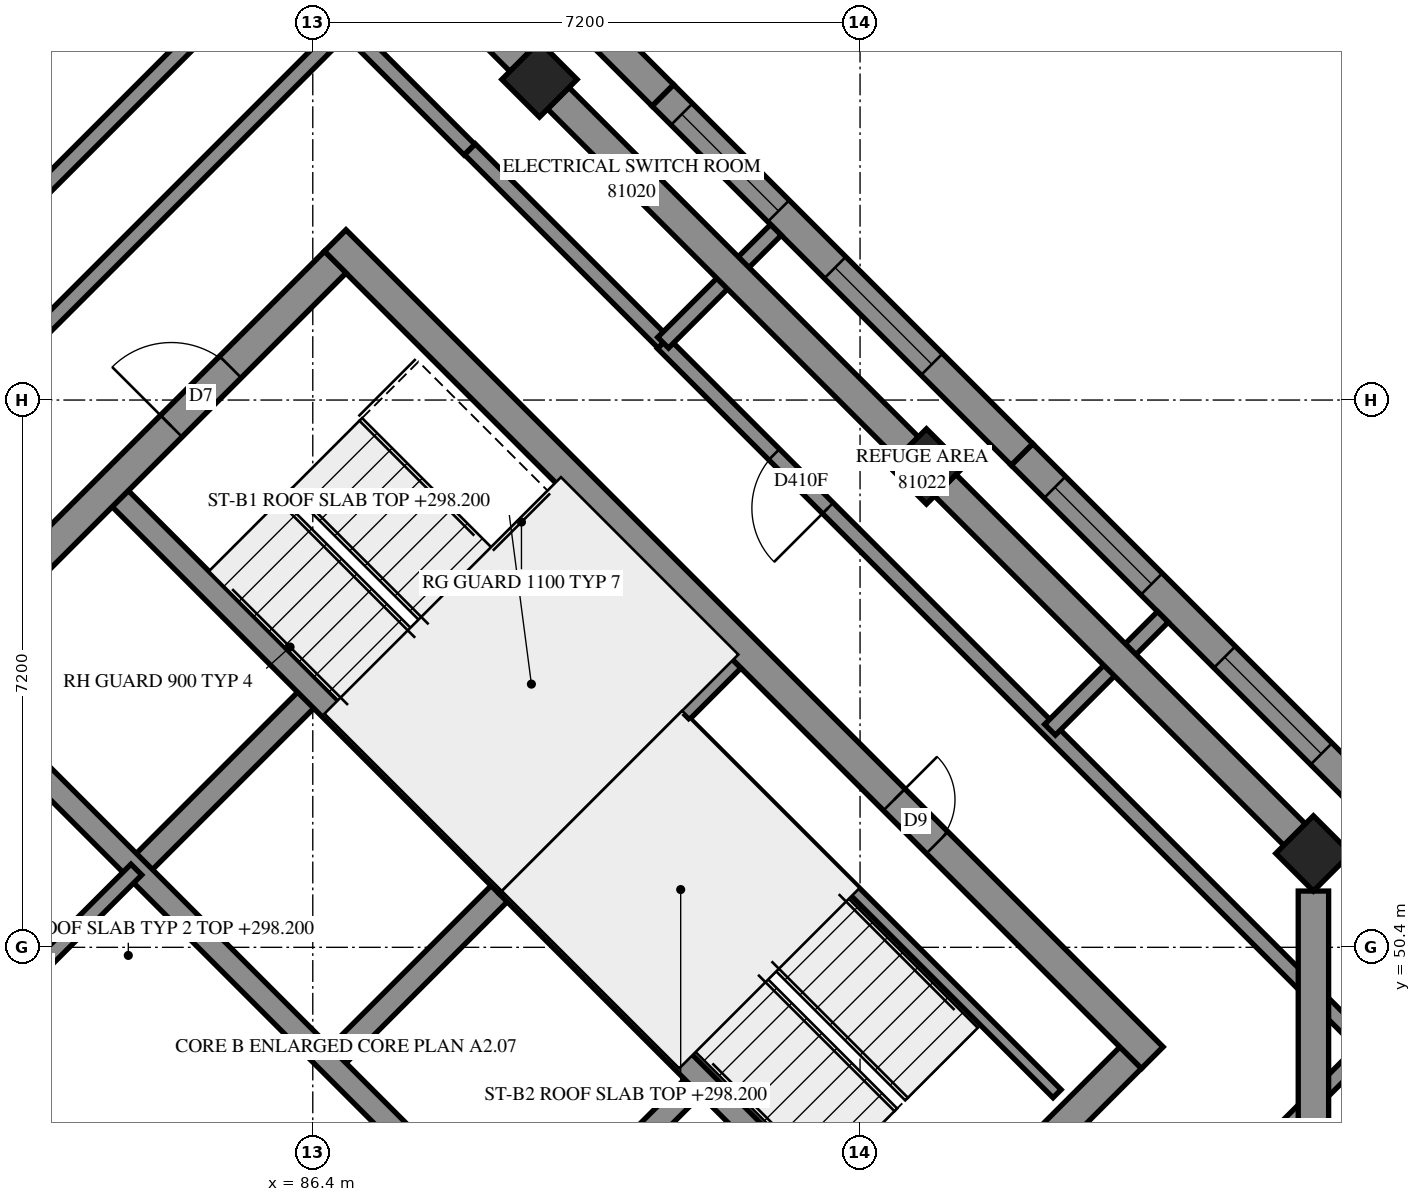
"""IFC4 building model, lengths in metres.
Left out: names, types, materials, properties, quantities, classifications, styles, units other than length and angle.
Written with IfcOpenShell. Run it as: python <this file> out.ifc"""

import sys

from ifc_helpers import new_model, si_unit, direction, frame, frame_2d, origin, origin_2d, place, context, subcontext, project, spatial, polyline, rectangle, outline, extrude, element, fill, save


model = new_model("IFC4")
c1 = context("Model", 3, precision=1e-05, world=origin(), true_north=direction((0.0, 1.0)))
c2 = subcontext(c1, "Body", "Model", "MODEL_VIEW")
j1 = project(units=[si_unit("LENGTHUNIT", "METRE"), si_unit("PLANEANGLEUNIT", "RADIAN")], contexts=[c1])
p1 = place(None, origin())
s1 = spatial("IfcSite", under=j1, at=p1, CompositionType="ELEMENT")
p2 = place(p1, origin())
s2 = spatial("IfcBuilding", under=s1, at=p2, CompositionType="ELEMENT")
p3 = place(p2, frame((0.0, 0.0, 298.2)))
s3 = spatial("IfcBuildingStorey", under=s2, at=p3, CompositionType="ELEMENT", Elevation=298.2)
for number, where, z_axis, x_axis in (
    (1, (89.382, 61.818, 0.0), (0.0, 0.0, 1.0), (0.707, -0.707, 0.0)),
    (2, (94.474, 56.727, 0.0), (0.0, 0.0, 1.0), (0.707, -0.707, 0.0)),
    (3, (99.565, 51.635, 0.0), (0.0, 0.0, 1.0), (0.707, -0.707, 0.0)),
):
    element("IfcColumn", number, at=place(p3, frame(where, z_axis=z_axis, x_axis=x_axis)), inside=s3, PredefinedType="COLUMN", context=c2, shape_type="SweptSolid", body=[
        extrude(rectangle(XDim=0.7, YDim=0.7, at=origin_2d()), origin(), (0.0, 0.0, 1.0), 3.5),
    ])
p4 = place(p3, frame((86.695, 59.696, -0.3), z_axis=(0.0, 0.0, 1.0), x_axis=(0.7071100706, -0.7071034917, 0.0)))
e4 = element("IfcWall", 4, at=p4, inside=s3, PredefinedType="SHEAR", context=c2, shape_type="SweptSolid", body=[
    extrude(outline(polyline([(0.0, 0.0), (15.2, 0.0), (15.2, 3.1), (0.0, 3.1), (0.0, 0.0)])), frame((0.0, 0.2, 0.0), z_axis=(0.0, -1.0, 0.0), x_axis=(1.0, 0.0, 0.0)), (0.0, 0.0, 1.0), 0.4),
])
p5 = place(p4, frame((10.4, 0.0, 0.3)))
e5 = element("IfcOpeningElement", 5, at=p5, cuts=e4, PredefinedType="OPENING", context=c2, shape_type="SweptSolid", body=[
    extrude(rectangle(XDim=0.8, YDim=2.1, at=frame_2d((0.4, 1.05))), frame((0.0, 0.21, 0.0), z_axis=(0.0, -1.0, 0.0), x_axis=(1.0, 0.0, 0.0)), (0.0, 0.0, 1.0), 0.42),
])
p6 = place(p3, frame((76.513, 49.231, -0.3), z_axis=(0.0, 0.0, 1.0), x_axis=(0.7071067812, 0.7071067812, 0.0)))
e6 = element("IfcWall", 6, at=p6, inside=s3, PredefinedType="SHEAR", context=c2, shape_type="SweptSolid", body=[
    extrude(outline(polyline([(0.0, 0.0), (14.4, 0.0), (14.4, 3.1), (0.0, 3.1), (0.0, 0.0)])), frame((0.0, 0.2, 0.0), z_axis=(0.0, -1.0, 0.0), x_axis=(1.0, 0.0, 0.0)), (0.0, 0.0, 1.0), 0.4),
])
p7 = place(p6, frame((4.55, 0.0, 0.3)))
e7 = element("IfcOpeningElement", 7, at=p7, cuts=e6, PredefinedType="OPENING", context=c2, shape_type="SweptSolid", body=[
    extrude(rectangle(XDim=1.1, YDim=2.1, at=frame_2d((0.55, 1.05))), frame((0.0, 0.21, 0.0), z_axis=(0.0, -1.0, 0.0), x_axis=(1.0, 0.0, 0.0)), (0.0, 0.0, 1.0), 0.42),
])
p8 = place(p6, frame((11.35, 0.0, 0.3)))
e8 = element("IfcOpeningElement", 8, at=p8, cuts=e6, PredefinedType="OPENING", context=c2, shape_type="SweptSolid", body=[
    extrude(rectangle(XDim=1.1, YDim=2.1, at=frame_2d((0.55, 1.05))), frame((0.0, 0.21, 0.0), z_axis=(0.0, -1.0, 0.0), x_axis=(1.0, 0.0, 0.0)), (0.0, 0.0, 1.0), 0.42),
])
p9 = place(p3, frame((89.17, 40.958, -0.3), z_axis=(0.0, 0.0, 1.0), x_axis=(0.7071067812, 0.7071067812, 0.0)))
e9 = element("IfcWall", 9, at=p9, inside=s3, PredefinedType="SHEAR", context=c2, shape_type="SweptSolid", body=[
    extrude(outline(polyline([(0.0, 0.0), (11.3, 0.0), (11.3, 3.1), (0.0, 3.1), (0.0, 0.0)])), frame((0.0, 0.2, 0.0), z_axis=(0.0, -1.0, 0.0), x_axis=(1.0, 0.0, 0.0)), (0.0, 0.0, 1.0), 0.4),
])
p10 = place(p9, frame((1.45, 0.0, 0.3)))
e10 = element("IfcOpeningElement", 10, at=p10, cuts=e9, PredefinedType="OPENING", context=c2, shape_type="SweptSolid", body=[
    extrude(rectangle(XDim=1.1, YDim=2.1, at=frame_2d((0.55, 1.05))), frame((0.0, 0.21, 0.0), z_axis=(0.0, -1.0, 0.0), x_axis=(1.0, 0.0, 0.0)), (0.0, 0.0, 1.0), 0.42),
])
p11 = place(p9, frame((8.25, 0.0, 0.3)))
e11 = element("IfcOpeningElement", 11, at=p11, cuts=e9, PredefinedType="OPENING", context=c2, shape_type="SweptSolid", body=[
    extrude(rectangle(XDim=1.1, YDim=2.1, at=frame_2d((0.55, 1.05))), frame((0.0, 0.21, 0.0), z_axis=(0.0, -1.0, 0.0), x_axis=(1.0, 0.0, 0.0)), (0.0, 0.0, 1.0), 0.42),
])
p12 = place(p3, frame((84.079, 51.423, 0.0), z_axis=(0.0, 0.0, 1.0), x_axis=(0.7071219326, 0.7070916295, 0.0)))
e12 = element("IfcWall", 12, at=p12, inside=s3, PredefinedType="SOLIDWALL", context=c2, shape_type="SweptSolid", body=[
    extrude(outline(polyline([(0.0, 0.0), (3.3, 0.0), (3.3, 3.5), (0.0, 3.5), (0.0, 0.0)])), frame((0.0, 0.15, 0.0), z_axis=(0.0, -1.0, 0.0), x_axis=(1.0, 0.0, 0.0)), (0.0, 0.0, 1.0), 0.3),
])
for number, where, z_axis, x_axis in (
    (13, (86.625, 48.878, 0.0), (0.0, 0.0, 1.0), (0.707, 0.707, 0.0)),
    (14, (89.17, 46.332, 0.0), (0.0, 0.0, 1.0), (0.707, 0.707, 0.0)),
):
    element("IfcWall", number, at=place(p3, frame(where, z_axis=z_axis, x_axis=x_axis)), inside=s3, PredefinedType="SOLIDWALL", context=c2, shape_type="SweptSolid", body=[
        extrude(outline(polyline([(0.0, 0.0), (3.3, 0.0), (3.3, 3.5), (0.0, 3.5), (0.0, 0.0)])), frame((0.0, 0.15, 0.0), z_axis=(0.0, -1.0, 0.0), x_axis=(1.0, 0.0, 0.0)), (0.0, 0.0, 1.0), 0.3),
    ])
p13 = place(p3, frame((78.988, 51.423, 0.0), z_axis=(0.0, 0.0, 1.0), x_axis=(0.7071067812, -0.7071067812, 0.0)))
e15 = element("IfcWall", 15, at=p13, inside=s3, PredefinedType="SOLIDWALL", context=c2, shape_type="SweptSolid", body=[
    extrude(outline(polyline([(0.0, 0.0), (14.4, 0.0), (14.4, 3.5), (0.0, 3.5), (0.0, 0.0)])), frame((0.0, 0.15, 0.0), z_axis=(0.0, -1.0, 0.0), x_axis=(1.0, 0.0, 0.0)), (0.0, 0.0, 1.0), 0.3),
])
p14 = place(p3, frame((81.534, 53.969, 0.0), z_axis=(0.0, 0.0, 1.0), x_axis=(0.707103309, -0.7071102534, 0.0)))
e16 = element("IfcWall", 16, at=p14, inside=s3, PredefinedType="SOLIDWALL", context=c2, shape_type="SweptSolid", body=[
    extrude(outline(polyline([(0.0, 0.0), (14.4, 0.0), (14.4, 3.5), (0.0, 3.5), (0.0, 0.0)])), frame((0.0, 0.15, 0.0), z_axis=(0.0, -1.0, 0.0), x_axis=(1.0, 0.0, 0.0)), (0.0, 0.0, 1.0), 0.3),
])
p15 = place(p14, frame((12.05, 0.0, 0.0)))
e17 = element("IfcOpeningElement", 17, at=p15, cuts=e16, PredefinedType="OPENING", context=c2, shape_type="SweptSolid", body=[
    extrude(rectangle(XDim=1.1, YDim=2.1, at=frame_2d((0.55, 1.05))), frame((0.0, 0.16, 0.0), z_axis=(0.0, -1.0, 0.0), x_axis=(1.0, 0.0, 0.0)), (0.0, 0.0, 1.0), 0.32),
])
for number, where, z_axis, x_axis in (
    (18, (83.867, 56.302, 0.0), (0.0, 0.0, 1.0), (0.707, -0.707, 0.0)),
    (19, (88.958, 51.211, 0.0), (0.0, 0.0, 1.0), (0.707, -0.707, 0.0)),
):
    element("IfcWall", number, at=place(p3, frame(where, z_axis=z_axis, x_axis=x_axis)), inside=s3, PredefinedType="SOLIDWALL", context=c2, shape_type="SweptSolid", body=[
        extrude(outline(polyline([(0.0, 0.0), (7.2, 0.0), (7.2, 3.5), (0.0, 3.5), (0.0, 0.0)])), frame((0.0, 0.15, 0.0), z_axis=(0.0, -1.0, 0.0), x_axis=(1.0, 0.0, 0.0)), (0.0, 0.0, 1.0), 0.3),
    ])
p16 = place(p3, frame((88.958, 51.211, 0.0), z_axis=(0.0, 0.0, 1.0), x_axis=(0.7071067812, 0.7071067812, 0.0)))
e20 = element("IfcWall", 20, at=p16, inside=s3, PredefinedType="SOLIDWALL", context=c2, shape_type="SweptSolid", body=[
    extrude(outline(polyline([(0.0, 0.0), (4.2, 0.0), (4.2, 3.5), (0.0, 3.5), (0.0, 0.0)])), frame((0.0, 0.15, 0.0), z_axis=(0.0, -1.0, 0.0), x_axis=(1.0, 0.0, 0.0)), (0.0, 0.0, 1.0), 0.3),
])
p17 = place(p3, frame((99.282, 46.544, 0.0), z_axis=(0.0, 0.0, 1.0), x_axis=(0.7071067812, 0.7071067812, 0.0)))
e21 = element("IfcWall", 21, at=p17, inside=s3, PredefinedType="SOLIDWALL", context=c2, shape_type="SweptSolid", body=[
    extrude(outline(polyline([(0.2, -0.2), (6.23, -0.2), (5.657, 0.2), (-0.2, 0.2), (0.2, -0.2)])), origin(), (0.0, 0.0, 1.0), 3.5),
])
p18 = place(p17, frame((1.1, 0.0, 0.7)))
e22 = element("IfcOpeningElement", 22, at=p18, cuts=e21, PredefinedType="OPENING", context=c2, shape_type="SweptSolid", body=[
    extrude(rectangle(XDim=1.8, YDim=2.2, at=frame_2d((0.9, 1.1))), frame((0.0, 0.21, 0.0), z_axis=(0.0, -1.0, 0.0), x_axis=(1.0, 0.0, 0.0)), (0.0, 0.0, 1.0), 0.42),
])
p19 = place(p3, frame((100.48, 52.134, 0.0), z_axis=(0.0, 0.0, 1.0), x_axis=(-0.7071067812, 0.7071067812, 0.0)))
e23 = element("IfcWall", 23, at=p19, inside=s3, PredefinedType="SOLIDWALL", context=c2, shape_type="SweptSolid", body=[
    extrude(outline(polyline([(0.036, -0.2), (6.718, -0.2), (6.718, 0.2), (-0.036, 0.2), (0.036, -0.2)])), origin(), (0.0, 0.0, 1.0), 3.5),
])
p20 = place(p19, frame((1.147, 0.0, 0.7)))
e24 = element("IfcOpeningElement", 24, at=p20, cuts=e23, PredefinedType="OPENING", context=c2, shape_type="SweptSolid", body=[
    extrude(rectangle(XDim=1.8, YDim=2.2, at=frame_2d((0.9, 1.1))), frame((0.0, 0.21, 0.0), z_axis=(0.0, -1.0, 0.0), x_axis=(1.0, 0.0, 0.0)), (0.0, 0.0, 1.0), 0.42),
])
p21 = place(p19, frame((4.306, 0.0, 0.7)))
e25 = element("IfcOpeningElement", 25, at=p21, cuts=e23, PredefinedType="OPENING", context=c2, shape_type="SweptSolid", body=[
    extrude(rectangle(XDim=1.8, YDim=2.2, at=frame_2d((0.9, 1.1))), frame((0.0, 0.21, 0.0), z_axis=(0.0, -1.0, 0.0), x_axis=(1.0, 0.0, 0.0)), (0.0, 0.0, 1.0), 0.42),
])
p22 = place(p3, frame((95.73, 56.884, 0.0), z_axis=(0.0, 0.0, 1.0), x_axis=(-0.7071067812, 0.7071067812, 0.0)))
e26 = element("IfcWall", 26, at=p22, inside=s3, PredefinedType="SOLIDWALL", context=c2, shape_type="SweptSolid", body=[
    extrude(outline(polyline([(0.0, -0.2), (6.682, -0.2), (6.682, 0.2), (0.0, 0.2), (0.0, -0.2)])), origin(), (0.0, 0.0, 1.0), 3.5),
])
p23 = place(p22, frame((1.677, 0.0, 0.7)))
e27 = element("IfcOpeningElement", 27, at=p23, cuts=e26, PredefinedType="OPENING", context=c2, shape_type="SweptSolid", body=[
    extrude(rectangle(XDim=1.8, YDim=2.2, at=frame_2d((0.9, 1.1))), frame((0.0, 0.21, 0.0), z_axis=(0.0, -1.0, 0.0), x_axis=(1.0, 0.0, 0.0)), (0.0, 0.0, 1.0), 0.42),
])
p24 = place(p22, frame((4.529, 0.0, 0.7)))
e28 = element("IfcOpeningElement", 28, at=p24, cuts=e26, PredefinedType="OPENING", context=c2, shape_type="SweptSolid", body=[
    extrude(rectangle(XDim=1.8, YDim=2.2, at=frame_2d((0.9, 1.1))), frame((0.0, 0.21, 0.0), z_axis=(0.0, -1.0, 0.0), x_axis=(1.0, 0.0, 0.0)), (0.0, 0.0, 1.0), 0.42),
])
p25 = place(p3, frame((91.005, 61.609, 0.0), z_axis=(0.0, 0.0, 1.0), x_axis=(-0.7071142638, 0.7070992985, 0.0)))
e29 = element("IfcWall", 29, at=p25, inside=s3, PredefinedType="SOLIDWALL", context=c2, shape_type="SweptSolid", body=[
    extrude(outline(polyline([(0.0, -0.2), (6.682, -0.2), (6.682, 0.2), (0.0, 0.2), (0.0, -0.2)])), origin(), (0.0, 0.0, 1.0), 3.5),
])
p26 = place(p25, frame((2.195, 0.0, 0.7)))
e30 = element("IfcOpeningElement", 30, at=p26, cuts=e29, PredefinedType="OPENING", context=c2, shape_type="SweptSolid", body=[
    extrude(rectangle(XDim=1.8, YDim=2.2, at=frame_2d((0.9, 1.1))), frame((0.0, 0.21, 0.0), z_axis=(0.0, -1.0, 0.0), x_axis=(1.0, 0.0, 0.0)), (0.0, 0.0, 1.0), 0.42),
])
p27 = place(p3, frame((91.313, 53.354, 0.0), z_axis=(0.0, 0.0, 1.0), x_axis=(0.7071140275, -0.7070995348, 0.0)))
e31 = element("IfcWall", 31, at=p27, inside=s3, PredefinedType="PARTITIONING", context=c2, shape_type="SweptSolid", body=[
    extrude(outline(polyline([(0.0, 0.0), (6.9, 0.0), (6.9, 3.5), (0.0, 3.5), (0.0, 0.0)])), frame((0.0, 0.075, 0.0), z_axis=(0.0, -1.0, 0.0), x_axis=(1.0, 0.0, 0.0)), (0.0, 0.0, 1.0), 0.15),
])
p28 = place(p3, frame((81.534, 48.878, 0.0), z_axis=(0.0, 0.0, 1.0), x_axis=(0.707092892, 0.7071206701, 0.0)))
e32 = element("IfcWall", 32, at=p28, inside=s3, PredefinedType="PARTITIONING", context=c2, shape_type="SweptSolid", body=[
    extrude(outline(polyline([(0.0, 0.0), (3.6, 0.0), (3.6, 3.5), (0.0, 3.5), (0.0, 0.0)])), frame((0.0, 0.1, 0.0), z_axis=(0.0, -1.0, 0.0), x_axis=(1.0, 0.0, 0.0)), (0.0, 0.0, 1.0), 0.2),
])
p29 = place(p28, frame((1.25, 0.0, 0.0)))
e33 = element("IfcOpeningElement", 33, at=p29, cuts=e32, PredefinedType="OPENING", context=c2, shape_type="SweptSolid", body=[
    extrude(rectangle(XDim=1.1, YDim=2.1, at=frame_2d((0.55, 1.05))), frame((0.0, 0.11, 0.0), z_axis=(0.0, -1.0, 0.0), x_axis=(1.0, 0.0, 0.0)), (0.0, 0.0, 1.0), 0.22),
])
p30 = place(p3, frame((100.269, 49.087, 0.0), z_axis=(0.0, 0.0, 1.0), x_axis=(-0.7071525817, 0.7070609777, 0.0)))
e34 = element("IfcWall", 34, at=p30, inside=s3, PredefinedType="PARTITIONING", context=c2, shape_type="SweptSolid", body=[
    extrude(rectangle(XDim=13.1, YDim=0.2, at=frame_2d((6.55, 0.0))), origin(), (0.0, 0.0, 1.0), 3.5),
])
p31 = place(p30, frame((10.029, 0.0, 0.0)))
e35 = element("IfcOpeningElement", 35, at=p31, cuts=e34, PredefinedType="OPENING", context=c2, shape_type="SweptSolid", body=[
    extrude(rectangle(XDim=1.0, YDim=2.1, at=frame_2d((0.5, 1.05))), frame((0.0, 0.11, 0.0), z_axis=(0.0, -1.0, 0.0), x_axis=(1.0, 0.0, 0.0)), (0.0, 0.0, 1.0), 0.22),
])
p32 = place(p3, frame((94.225, 43.045, 0.0), z_axis=(0.0, 0.0, 1.0), x_axis=(0.7071067812, 0.7071067812, 0.0)))
e36 = element("IfcWall", 36, at=p32, inside=s3, PredefinedType="PARTITIONING", context=c2, shape_type="SweptSolid", body=[
    extrude(rectangle(XDim=8.55, YDim=0.2, at=frame_2d((4.275, 0.0))), origin(), (0.0, 0.0, 1.0), 3.5),
])
p33 = place(p32, frame((0.256, 0.0, 0.0)))
e37 = element("IfcOpeningElement", 37, at=p33, cuts=e36, PredefinedType="OPENING", context=c2, shape_type="SweptSolid", body=[
    extrude(rectangle(XDim=1.0, YDim=2.1, at=frame_2d((0.5, 1.05))), frame((0.0, 0.11, 0.0), z_axis=(0.0, -1.0, 0.0), x_axis=(1.0, 0.0, 0.0)), (0.0, 0.0, 1.0), 0.22),
])
p34 = place(p3, frame((80.801, 56.491, 0.0), z_axis=(0.0, 0.0, 1.0), x_axis=(0.7071067812, 0.7071067812, 0.0)))
e38 = element("IfcWall", 38, at=p34, inside=s3, PredefinedType="PARTITIONING", context=c2, shape_type="SweptSolid", body=[
    extrude(rectangle(XDim=8.533, YDim=0.2, at=frame_2d((4.267, 0.0))), origin(), (0.0, 0.0, 1.0), 3.5),
])
p35 = place(p34, frame((0.856, 0.0, 0.0)))
e39 = element("IfcOpeningElement", 39, at=p35, cuts=e38, PredefinedType="OPENING", context=c2, shape_type="SweptSolid", body=[
    extrude(rectangle(XDim=1.0, YDim=2.1, at=frame_2d((0.5, 1.05))), frame((0.0, 0.11, 0.0), z_axis=(0.0, -1.0, 0.0), x_axis=(1.0, 0.0, 0.0)), (0.0, 0.0, 1.0), 0.22),
])
p36 = place(p3, frame((88.466, 60.9, 0.0), z_axis=(0.0, 0.0, 1.0), x_axis=(0.7073845681, -0.7068288851, 0.0)))
e40 = element("IfcWall", 40, at=p36, inside=s3, PredefinedType="PARTITIONING", context=c2, shape_type="SweptSolid", body=[
    extrude(rectangle(XDim=3.599, YDim=0.2, at=frame_2d((1.8, 0.0))), origin(), (0.0, 0.0, 1.0), 3.5),
])
p37 = place(p3, frame((86.835, 62.52, 0.0), z_axis=(0.0, 0.0, 1.0), x_axis=(0.7071067812, -0.7071067812, 0.0)))
e41 = element("IfcWall", 41, at=p37, inside=s3, PredefinedType="PARTITIONING", context=c2, shape_type="SweptSolid", body=[
    extrude(rectangle(XDim=2.3, YDim=0.2, at=frame_2d((1.15, 0.0))), origin(), (0.0, 0.0, 1.0), 3.5),
])
p38 = place(p3, frame((80.799, 58.327, 0.0), z_axis=(0.0, 0.0, 1.0), x_axis=(0.7071067812, 0.7071067812, 0.0)))
e42 = element("IfcWall", 42, at=p38, inside=s3, PredefinedType="PARTITIONING", context=c2, shape_type="SweptSolid", body=[
    extrude(outline(polyline([(0.0, -0.1), (9.338, -0.1), (9.338, 0.1), (0.0, 0.1), (0.0, -0.1)])), origin(), (0.0, 0.0, 1.0), 3.5),
])
p39 = place(p3, frame((96.099, 53.263, 0.0), z_axis=(0.0, 0.0, 1.0), x_axis=(0.7071067812, 0.7071067812, 0.0)))
e43 = element("IfcWall", 43, at=p39, inside=s3, PredefinedType="PARTITIONING", context=c2, shape_type="SweptSolid", body=[
    extrude(outline(polyline([(0.0, -0.1), (2.1, -0.1), (2.1, 0.1), (0.0, 0.1), (0.0, -0.1)])), origin(), (0.0, 0.0, 1.0), 3.5),
])
p40 = place(p3, frame((91.009, 58.355, 0.0), z_axis=(0.0, 0.0, 1.0), x_axis=(0.7071067812, 0.7071067812, 0.0)))
e44 = element("IfcWall", 44, at=p40, inside=s3, PredefinedType="PARTITIONING", context=c2, shape_type="SweptSolid", body=[
    extrude(outline(polyline([(0.0, -0.1), (2.098, -0.1), (2.098, 0.1), (0.0, 0.1), (0.0, -0.1)])), origin(), (0.0, 0.0, 1.0), 3.5),
])
p41 = place(p20, origin())
e45 = element("IfcWindow", 45, at=p41, inside=s3, PartitioningType="SINGLE_PANEL", PredefinedType="WINDOW", context=c2, shape_type="SweptSolid", body=[
    extrude(rectangle(XDim=1.8, YDim=2.2, at=frame_2d((0.9, 1.1))), frame((0.0, 0.08, 0.0), z_axis=(0.0, -1.0, 0.0), x_axis=(1.0, 0.0, 0.0)), (0.0, 0.0, 1.0), 0.06),
])
fill(e24, e45)
p42 = place(p21, origin())
e46 = element("IfcWindow", 46, at=p42, inside=s3, PartitioningType="SINGLE_PANEL", PredefinedType="WINDOW", context=c2, shape_type="SweptSolid", body=[
    extrude(rectangle(XDim=1.8, YDim=2.2, at=frame_2d((0.9, 1.1))), frame((0.0, 0.08, 0.0), z_axis=(0.0, -1.0, 0.0), x_axis=(1.0, 0.0, 0.0)), (0.0, 0.0, 1.0), 0.06),
])
fill(e25, e46)
p43 = place(p23, origin())
e47 = element("IfcWindow", 47, at=p43, inside=s3, PartitioningType="SINGLE_PANEL", PredefinedType="WINDOW", context=c2, shape_type="SweptSolid", body=[
    extrude(rectangle(XDim=1.8, YDim=2.2, at=frame_2d((0.9, 1.1))), frame((0.0, 0.08, 0.0), z_axis=(0.0, -1.0, 0.0), x_axis=(1.0, 0.0, 0.0)), (0.0, 0.0, 1.0), 0.06),
])
fill(e27, e47)
p44 = place(p24, origin())
e48 = element("IfcWindow", 48, at=p44, inside=s3, PartitioningType="SINGLE_PANEL", PredefinedType="WINDOW", context=c2, shape_type="SweptSolid", body=[
    extrude(rectangle(XDim=1.8, YDim=2.2, at=frame_2d((0.9, 1.1))), frame((0.0, 0.08, 0.0), z_axis=(0.0, -1.0, 0.0), x_axis=(1.0, 0.0, 0.0)), (0.0, 0.0, 1.0), 0.06),
])
fill(e28, e48)
p45 = place(p5, origin())
e49 = element("IfcDoor", 49, at=p45, inside=s3, OperationType="SINGLE_SWING_RIGHT", PredefinedType="DOOR", context=c2, shape_type="SweptSolid", body=[
    extrude(rectangle(XDim=0.8, YDim=2.1, at=frame_2d((0.4, 1.05))), frame((0.0, 0.025, 0.0), z_axis=(0.0, -1.0, 0.0), x_axis=(1.0, 0.0, 0.0)), (0.0, 0.0, 1.0), 0.05),
])
fill(e5, e49)
p46 = place(p8, origin())
e50 = element("IfcDoor", 50, at=p46, inside=s3, OperationType="SINGLE_SWING_LEFT", PredefinedType="DOOR", context=c2, shape_type="SweptSolid", body=[
    extrude(rectangle(XDim=1.1, YDim=2.1, at=frame_2d((0.55, 1.05))), frame((0.0, 0.025, 0.0), z_axis=(0.0, -1.0, 0.0), x_axis=(1.0, 0.0, 0.0)), (0.0, 0.0, 1.0), 0.05),
])
fill(e8, e50)
p47 = place(p29, origin())
e51 = element("IfcDoor", 51, at=p47, inside=s3, OperationType="DOUBLE_DOOR_SINGLE_SWING", PredefinedType="DOOR", context=c2, shape_type="SweptSolid", body=[
    extrude(rectangle(XDim=1.1, YDim=2.1, at=frame_2d((0.55, 1.05))), frame((0.0, 0.025, 0.0), z_axis=(0.0, -1.0, 0.0), x_axis=(1.0, 0.0, 0.0)), (0.0, 0.0, 1.0), 0.05),
])
fill(e33, e51)
p48 = place(p31, origin())
e52 = element("IfcDoor", 52, at=p48, inside=s3, OperationType="SINGLE_SWING_RIGHT", PredefinedType="DOOR", context=c2, shape_type="SweptSolid", body=[
    extrude(rectangle(XDim=1.0, YDim=2.1, at=frame_2d((0.5, 1.05))), frame((0.0, 0.025, 0.0), z_axis=(0.0, -1.0, 0.0), x_axis=(1.0, 0.0, 0.0)), (0.0, 0.0, 1.0), 0.05),
])
fill(e35, e52)
save(model, sys.argv[1])
